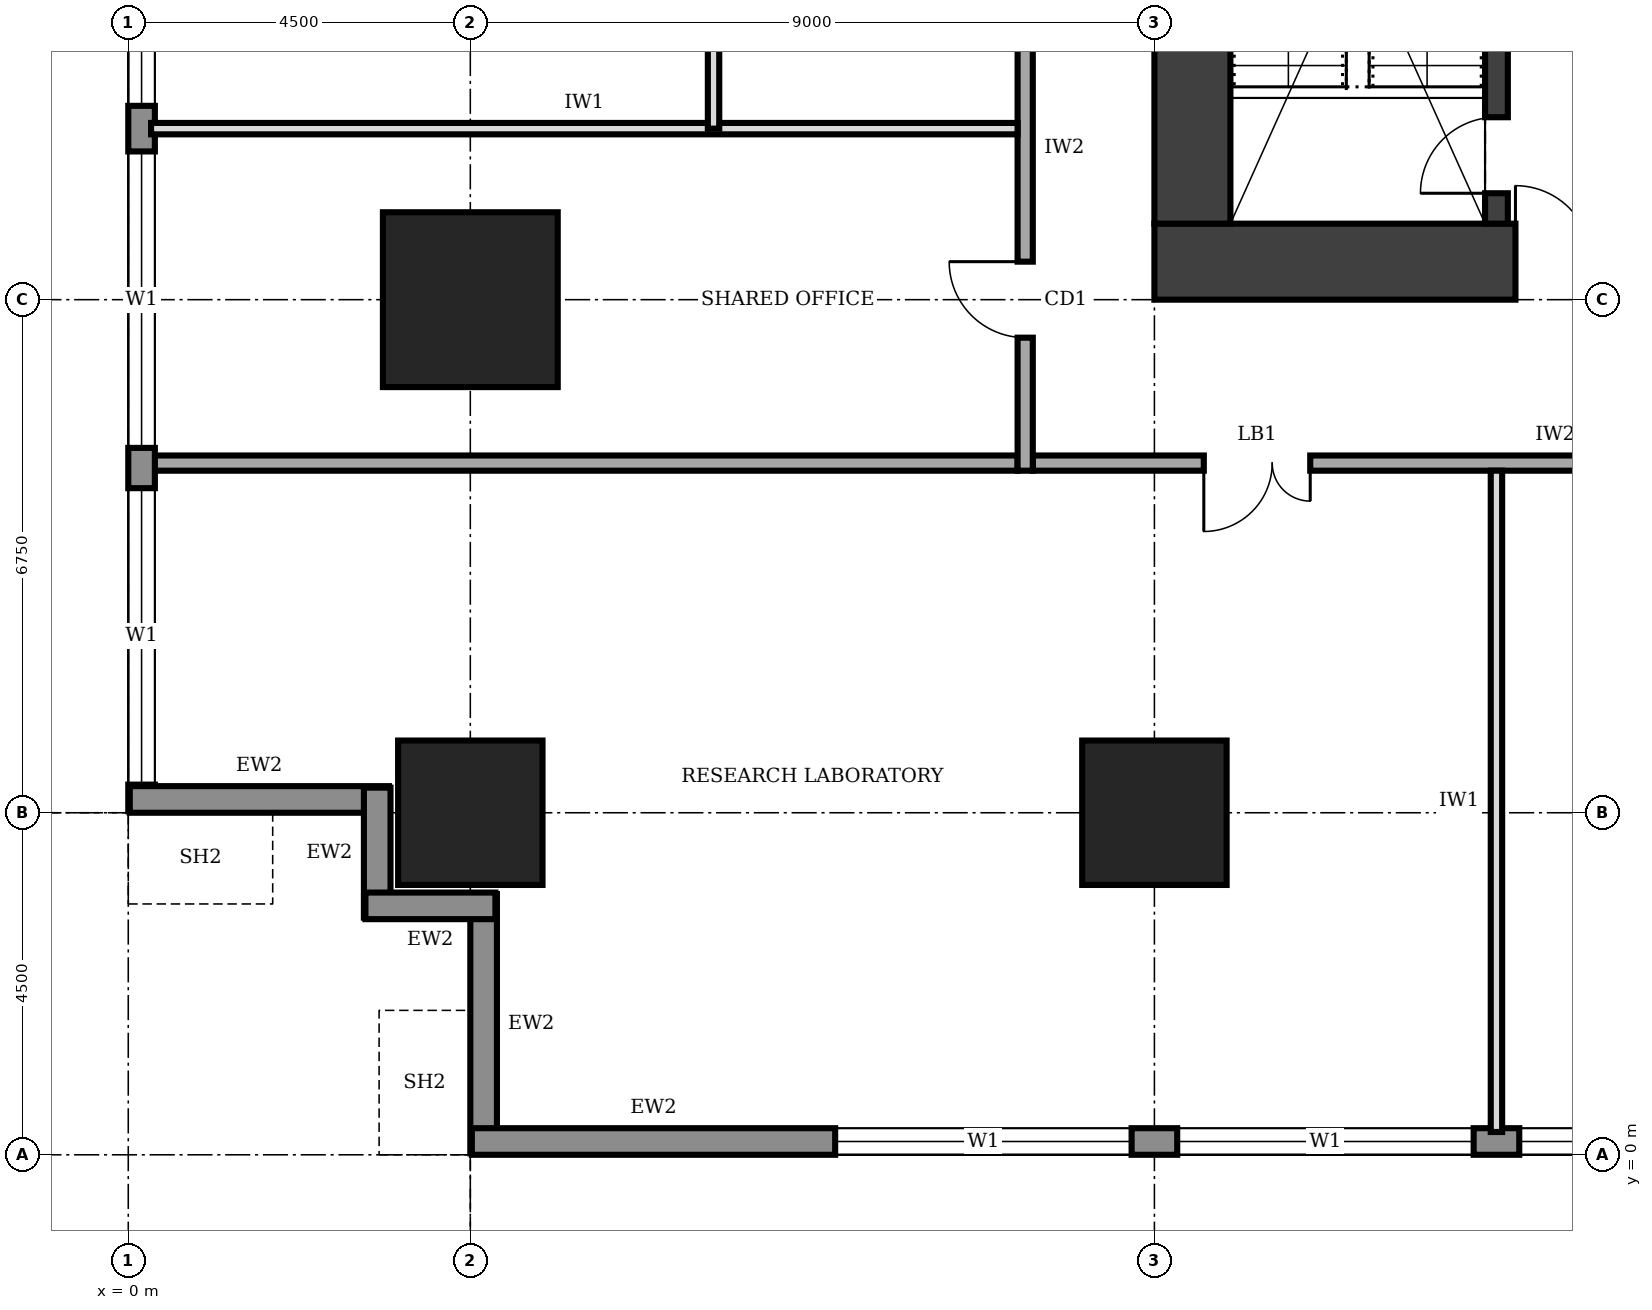
"""IFC4 building model, lengths in metres.
Left out: names, types, materials, properties, quantities, classifications, styles, units other than length and angle.
Written with IfcOpenShell. Run it as: python <this file> out.ifc"""

import sys

from ifc_helpers import new_model, si_unit, direction, frame, frame_2d, origin, origin_2d, place, context, subcontext, project, spatial, rectangle, extrude, element, fill, save


model = new_model("IFC4")
c1 = context("Model", 3, precision=1e-05, world=origin(), true_north=direction((0.0, 1.0)))
c2 = subcontext(c1, "Body", "Model", "MODEL_VIEW")
j1 = project(units=[si_unit("LENGTHUNIT", "METRE"), si_unit("PLANEANGLEUNIT", "RADIAN")], contexts=[c1])
p1 = place(None, origin())
s1 = spatial("IfcSite", under=j1, at=p1, CompositionType="ELEMENT")
p2 = place(p1, origin())
s2 = spatial("IfcBuilding", under=s1, at=p2, CompositionType="ELEMENT")
p3 = place(p2, frame((0.0, 0.0, 117.0)))
s3 = spatial("IfcBuildingStorey", under=s2, at=p3, CompositionType="ELEMENT", Elevation=117.0)
p4 = place(p3, frame((13.5, 11.75, 0.0), z_axis=(0.0, 0.0, 1.0), x_axis=(1.0, 0.0, 0.0)))
e1 = element("IfcWall", 1, at=p4, inside=s3, PredefinedType="SHEAR", context=c2, shape_type="SweptSolid", body=[
    extrude(rectangle(XDim=13.5, YDim=1.0, at=frame_2d((6.75, 0.0))), origin(), (0.0, 0.0, 1.0), 4.0),
])
p5 = place(p4, frame((4.75, 0.0, 0.0)))
e2 = element("IfcOpeningElement", 2, at=p5, cuts=e1, PredefinedType="OPENING", context=c2, shape_type="SweptSolid", body=[
    extrude(rectangle(XDim=1.0, YDim=2.1, at=frame_2d((0.5, 1.05))), frame((0.0, 0.51, 0.0), z_axis=(0.0, -1.0, 0.0), x_axis=(1.0, 0.0, 0.0)), (0.0, 0.0, 1.0), 1.02),
])
p6 = place(p3, frame((14.0, 28.25, 0.0), z_axis=(0.0, 0.0, 1.0), x_axis=(0.0, -1.0, 0.0)))
e3 = element("IfcWall", 3, at=p6, inside=s3, PredefinedType="SHEAR", context=c2, shape_type="SweptSolid", body=[
    extrude(rectangle(XDim=16.0, YDim=1.0, at=frame_2d((8.0, 0.0))), origin(), (0.0, 0.0, 1.0), 4.0),
])
p7 = place(p3, frame((18.0, 12.25, 0.0), z_axis=(0.0, 0.0, 1.0), x_axis=(0.0, 1.0, 0.0)))
e4 = element("IfcWall", 4, at=p7, inside=s3, PredefinedType="SHEAR", context=c2, shape_type="SweptSolid", body=[
    extrude(rectangle(XDim=16.0, YDim=0.3, at=frame_2d((8.0, 0.0))), origin(), (0.0, 0.0, 1.0), 4.0),
])
p8 = place(p7, frame((0.4, 0.0, 0.0)))
e5 = element("IfcOpeningElement", 5, at=p8, cuts=e4, PredefinedType="OPENING", context=c2, shape_type="SweptSolid", body=[
    extrude(rectangle(XDim=1.0, YDim=2.1, at=frame_2d((0.5, 1.05))), frame((0.0, 0.16, 0.0), z_axis=(0.0, -1.0, 0.0), x_axis=(1.0, 0.0, 0.0)), (0.0, 0.0, 1.0), 0.32),
])
p9 = place(p7, frame((14.525, 0.0, 0.0)))
e6 = element("IfcOpeningElement", 6, at=p9, cuts=e4, PredefinedType="OPENING", context=c2, shape_type="SweptSolid", body=[
    extrude(rectangle(XDim=1.1, YDim=2.1, at=frame_2d((0.55, 1.05))), frame((0.0, 0.16, 0.0), z_axis=(0.0, -1.0, 0.0), x_axis=(1.0, 0.0, 0.0)), (0.0, 0.0, 1.0), 0.32),
])
p10 = place(p7, frame((9.0, 0.0, 0.0)))
e7 = element("IfcOpeningElement", 7, at=p10, cuts=e4, PredefinedType="OPENING", context=c2, shape_type="SweptSolid", body=[
    extrude(rectangle(XDim=1.0, YDim=2.1, at=frame_2d((0.5, 1.05))), frame((0.0, 0.16, 0.0), z_axis=(0.0, -1.0, 0.0), x_axis=(1.0, 0.0, 0.0)), (0.0, 0.0, 1.0), 0.32),
])
p11 = place(p7, frame((12.0, 0.0, 0.0)))
e8 = element("IfcOpeningElement", 8, at=p11, cuts=e4, PredefinedType="OPENING", context=c2, shape_type="SweptSolid", body=[
    extrude(rectangle(XDim=1.0, YDim=2.1, at=frame_2d((0.5, 1.05))), frame((0.0, 0.16, 0.0), z_axis=(0.0, -1.0, 0.0), x_axis=(1.0, 0.0, 0.0)), (0.0, 0.0, 1.0), 0.32),
])
for number, where, z_axis, x_axis in (
    (9, (4.5, 4.5, 0.0), (0.0, 0.0, 1.0), (1.0, 0.0, 0.0)),
    (10, (13.5, 4.5, 0.0), (0.0, 0.0, 1.0), (1.0, 0.0, 0.0)),
):
    element("IfcColumn", number, at=place(p3, frame(where, z_axis=z_axis, x_axis=x_axis)), inside=s3, PredefinedType="COLUMN", context=c2, shape_type="SweptSolid", body=[
        extrude(rectangle(XDim=1.9, YDim=1.9, at=origin_2d()), origin(), (0.0, 0.0, 1.0), 4.0),
    ])
p12 = place(p3, frame((4.5, 11.25, 0.0), z_axis=(0.0, 0.0, 1.0), x_axis=(1.0, 0.0, 0.0)))
e11 = element("IfcColumn", 11, at=p12, inside=s3, PredefinedType="COLUMN", context=c2, shape_type="SweptSolid", body=[
    extrude(rectangle(XDim=2.3, YDim=2.3, at=origin_2d()), origin(), (0.0, 0.0, 1.0), 4.0),
])
p13 = place(p3, frame((4.675, 3.43, 0.0), z_axis=(0.0, 0.0, 1.0), x_axis=(0.0, -1.0, 0.0)))
e12 = element("IfcWall", 12, at=p13, inside=s3, PredefinedType="STANDARD", context=c2, shape_type="SweptSolid", body=[
    extrude(rectangle(XDim=3.41, YDim=0.35, at=frame_2d((1.705, 0.0))), origin(), (0.0, 0.0, 1.0), 2.85),
])
p14 = place(p3, frame((4.52, 0.175, 0.0), z_axis=(0.0, 0.0, 1.0), x_axis=(1.0, 0.0, 0.0)))
e13 = element("IfcWall", 13, at=p14, inside=s3, PredefinedType="STANDARD", context=c2, shape_type="SweptSolid", body=[
    extrude(rectangle(XDim=31.46, YDim=0.35, at=frame_2d((15.73, 0.0))), origin(), (0.0, 0.0, 1.0), 3.75),
])
p15 = place(p14, frame((4.78, 0.0, 0.9)))
e14 = element("IfcOpeningElement", 14, at=p15, cuts=e13, PredefinedType="OPENING", context=c2, shape_type="SweptSolid", body=[
    extrude(rectangle(XDim=3.9, YDim=2.2, at=frame_2d((1.95, 1.1))), frame((0.0, 0.185, 0.0), z_axis=(0.0, -1.0, 0.0), x_axis=(1.0, 0.0, 0.0)), (0.0, 0.0, 1.0), 0.37),
])
p16 = place(p14, frame((9.28, 0.0, 0.9)))
e15 = element("IfcOpeningElement", 15, at=p16, cuts=e13, PredefinedType="OPENING", context=c2, shape_type="SweptSolid", body=[
    extrude(rectangle(XDim=3.9, YDim=2.2, at=frame_2d((1.95, 1.1))), frame((0.0, 0.185, 0.0), z_axis=(0.0, -1.0, 0.0), x_axis=(1.0, 0.0, 0.0)), (0.0, 0.0, 1.0), 0.37),
])
p17 = place(p14, frame((13.78, 0.0, 0.9)))
e16 = element("IfcOpeningElement", 16, at=p17, cuts=e13, PredefinedType="OPENING", context=c2, shape_type="SweptSolid", body=[
    extrude(rectangle(XDim=3.9, YDim=2.2, at=frame_2d((1.95, 1.1))), frame((0.0, 0.185, 0.0), z_axis=(0.0, -1.0, 0.0), x_axis=(1.0, 0.0, 0.0)), (0.0, 0.0, 1.0), 0.37),
])
p18 = place(p14, frame((18.28, 0.0, 0.9)))
e17 = element("IfcOpeningElement", 17, at=p18, cuts=e13, PredefinedType="OPENING", context=c2, shape_type="SweptSolid", body=[
    extrude(rectangle(XDim=3.9, YDim=2.2, at=frame_2d((1.95, 1.1))), frame((0.0, 0.185, 0.0), z_axis=(0.0, -1.0, 0.0), x_axis=(1.0, 0.0, 0.0)), (0.0, 0.0, 1.0), 0.37),
])
p19 = place(p14, frame((22.78, 0.0, 0.9)))
e18 = element("IfcOpeningElement", 18, at=p19, cuts=e13, PredefinedType="OPENING", context=c2, shape_type="SweptSolid", body=[
    extrude(rectangle(XDim=3.9, YDim=2.2, at=frame_2d((1.95, 1.1))), frame((0.0, 0.185, 0.0), z_axis=(0.0, -1.0, 0.0), x_axis=(1.0, 0.0, 0.0)), (0.0, 0.0, 1.0), 0.37),
])
p20 = place(p14, frame((27.21, 0.0, 0.9)))
e19 = element("IfcOpeningElement", 19, at=p20, cuts=e13, PredefinedType="OPENING", context=c2, shape_type="SweptSolid", body=[
    extrude(rectangle(XDim=3.9, YDim=2.2, at=frame_2d((1.95, 1.1))), frame((0.0, 0.185, 0.0), z_axis=(0.0, -1.0, 0.0), x_axis=(1.0, 0.0, 0.0)), (0.0, 0.0, 1.0), 0.37),
])
p21 = place(p3, frame((0.175, 35.98, 0.0), z_axis=(0.0, 0.0, 1.0), x_axis=(0.0, -1.0, 0.0)))
e20 = element("IfcWall", 20, at=p21, inside=s3, PredefinedType="STANDARD", context=c2, shape_type="SweptSolid", body=[
    extrude(rectangle(XDim=31.46, YDim=0.35, at=frame_2d((15.73, 0.0))), origin(), (0.0, 0.0, 1.0), 3.75),
])
p22 = place(p21, frame((27.21, 0.0, 0.9)))
e21 = element("IfcOpeningElement", 21, at=p22, cuts=e20, PredefinedType="OPENING", context=c2, shape_type="SweptSolid", body=[
    extrude(rectangle(XDim=3.9, YDim=2.2, at=frame_2d((1.95, 1.1))), frame((0.0, 0.185, 0.0), z_axis=(0.0, -1.0, 0.0), x_axis=(1.0, 0.0, 0.0)), (0.0, 0.0, 1.0), 0.37),
])
p23 = place(p21, frame((22.78, 0.0, 0.9)))
e22 = element("IfcOpeningElement", 22, at=p23, cuts=e20, PredefinedType="OPENING", context=c2, shape_type="SweptSolid", body=[
    extrude(rectangle(XDim=3.9, YDim=2.2, at=frame_2d((1.95, 1.1))), frame((0.0, 0.185, 0.0), z_axis=(0.0, -1.0, 0.0), x_axis=(1.0, 0.0, 0.0)), (0.0, 0.0, 1.0), 0.37),
])
p24 = place(p21, frame((18.28, 0.0, 0.9)))
e23 = element("IfcOpeningElement", 23, at=p24, cuts=e20, PredefinedType="OPENING", context=c2, shape_type="SweptSolid", body=[
    extrude(rectangle(XDim=3.9, YDim=2.2, at=frame_2d((1.95, 1.1))), frame((0.0, 0.185, 0.0), z_axis=(0.0, -1.0, 0.0), x_axis=(1.0, 0.0, 0.0)), (0.0, 0.0, 1.0), 0.37),
])
p25 = place(p21, frame((13.78, 0.0, 0.9)))
e24 = element("IfcOpeningElement", 24, at=p25, cuts=e20, PredefinedType="OPENING", context=c2, shape_type="SweptSolid", body=[
    extrude(rectangle(XDim=3.9, YDim=2.2, at=frame_2d((1.95, 1.1))), frame((0.0, 0.185, 0.0), z_axis=(0.0, -1.0, 0.0), x_axis=(1.0, 0.0, 0.0)), (0.0, 0.0, 1.0), 0.37),
])
p26 = place(p21, frame((9.28, 0.0, 0.9)))
e25 = element("IfcOpeningElement", 25, at=p26, cuts=e20, PredefinedType="OPENING", context=c2, shape_type="SweptSolid", body=[
    extrude(rectangle(XDim=3.9, YDim=2.2, at=frame_2d((1.95, 1.1))), frame((0.0, 0.185, 0.0), z_axis=(0.0, -1.0, 0.0), x_axis=(1.0, 0.0, 0.0)), (0.0, 0.0, 1.0), 0.37),
])
p27 = place(p21, frame((4.78, 0.0, 0.9)))
e26 = element("IfcOpeningElement", 26, at=p27, cuts=e20, PredefinedType="OPENING", context=c2, shape_type="SweptSolid", body=[
    extrude(rectangle(XDim=3.9, YDim=2.2, at=frame_2d((1.95, 1.1))), frame((0.0, 0.185, 0.0), z_axis=(0.0, -1.0, 0.0), x_axis=(1.0, 0.0, 0.0)), (0.0, 0.0, 1.0), 0.37),
])
p28 = place(p3, frame((0.02, 4.675, 0.0), z_axis=(0.0, 0.0, 1.0), x_axis=(1.0, 0.0, 0.0)))
e27 = element("IfcWall", 27, at=p28, inside=s3, PredefinedType="STANDARD", context=c2, shape_type="SweptSolid", body=[
    extrude(rectangle(XDim=3.41, YDim=0.35, at=frame_2d((1.705, 0.0))), origin(), (0.0, 0.0, 1.0), 2.85),
])
for number, where, z_axis, x_axis in (
    (28, (3.275, 4.83, 0.0), (0.0, 0.0, 1.0), (0.0, -1.0, 0.0)),
    (29, (3.12, 3.275, 0.0), (0.0, 0.0, 1.0), (1.0, 0.0, 0.0)),
):
    element("IfcWall", number, at=place(p3, frame(where, z_axis=z_axis, x_axis=x_axis)), inside=s3, PredefinedType="STANDARD", context=c2, shape_type="SweptSolid", body=[
        extrude(rectangle(XDim=1.71, YDim=0.35, at=frame_2d((0.855, 0.0))), origin(), (0.0, 0.0, 1.0), 3.75),
    ])
p29 = place(p3, frame((11.9, 9.1, 0.0), z_axis=(0.0, 0.0, 1.0), x_axis=(1.0, 0.0, 0.0)))
e30 = element("IfcWall", 30, at=p29, inside=s3, PredefinedType="SOLIDWALL", context=c2, shape_type="SweptSolid", body=[
    extrude(rectangle(XDim=17.65, YDim=0.2, at=frame_2d((8.825, 0.0))), origin(), (0.0, 0.0, 1.0), 3.75),
])
p30 = place(p29, frame((2.25, 0.0, 0.0)))
e31 = element("IfcOpeningElement", 31, at=p30, cuts=e30, PredefinedType="OPENING", context=c2, shape_type="SweptSolid", body=[
    extrude(rectangle(XDim=1.4, YDim=2.1, at=frame_2d((0.7, 1.05))), frame((0.0, 0.11, 0.0), z_axis=(0.0, -1.0, 0.0), x_axis=(1.0, 0.0, 0.0)), (0.0, 0.0, 1.0), 0.22),
])
p31 = place(p29, frame((10.1, 0.0, 0.0)))
e32 = element("IfcOpeningElement", 32, at=p31, cuts=e30, PredefinedType="OPENING", context=c2, shape_type="SweptSolid", body=[
    extrude(rectangle(XDim=1.0, YDim=2.1, at=frame_2d((0.5, 1.05))), frame((0.0, 0.11, 0.0), z_axis=(0.0, -1.0, 0.0), x_axis=(1.0, 0.0, 0.0)), (0.0, 0.0, 1.0), 0.22),
])
p32 = place(p29, frame((15.875, 0.0, 0.0)))
e33 = element("IfcOpeningElement", 33, at=p32, cuts=e30, PredefinedType="OPENING", context=c2, shape_type="SweptSolid", body=[
    extrude(rectangle(XDim=1.0, YDim=2.1, at=frame_2d((0.5, 1.05))), frame((0.0, 0.11, 0.0), z_axis=(0.0, -1.0, 0.0), x_axis=(1.0, 0.0, 0.0)), (0.0, 0.0, 1.0), 0.22),
])
p33 = place(p3, frame((11.8, 32.05, 0.0), z_axis=(0.0, 0.0, 1.0), x_axis=(0.0, -1.0, 0.0)))
e34 = element("IfcWall", 34, at=p33, inside=s3, PredefinedType="SOLIDWALL", context=c2, shape_type="SweptSolid", body=[
    extrude(rectangle(XDim=23.05, YDim=0.2, at=frame_2d((11.525, 0.0))), origin(), (0.0, 0.0, 1.0), 3.75),
])
p34 = place(p33, frame((20.3, 0.0, 0.0)))
e35 = element("IfcOpeningElement", 35, at=p34, cuts=e34, PredefinedType="OPENING", context=c2, shape_type="SweptSolid", body=[
    extrude(rectangle(XDim=1.0, YDim=2.1, at=frame_2d((0.5, 1.05))), frame((0.0, 0.11, 0.0), z_axis=(0.0, -1.0, 0.0), x_axis=(1.0, 0.0, 0.0)), (0.0, 0.0, 1.0), 0.22),
])
p35 = place(p33, frame((16.4, 0.0, 0.0)))
e36 = element("IfcOpeningElement", 36, at=p35, cuts=e34, PredefinedType="OPENING", context=c2, shape_type="SweptSolid", body=[
    extrude(rectangle(XDim=0.9, YDim=2.1, at=frame_2d((0.45, 1.05))), frame((0.0, 0.11, 0.0), z_axis=(0.0, -1.0, 0.0), x_axis=(1.0, 0.0, 0.0)), (0.0, 0.0, 1.0), 0.22),
])
p36 = place(p33, frame((11.6, 0.0, 0.0)))
e37 = element("IfcOpeningElement", 37, at=p36, cuts=e34, PredefinedType="OPENING", context=c2, shape_type="SweptSolid", body=[
    extrude(rectangle(XDim=0.9, YDim=2.1, at=frame_2d((0.45, 1.05))), frame((0.0, 0.11, 0.0), z_axis=(0.0, -1.0, 0.0), x_axis=(1.0, 0.0, 0.0)), (0.0, 0.0, 1.0), 0.22),
])
p37 = place(p33, frame((8.55, 0.0, 0.0)))
e38 = element("IfcOpeningElement", 38, at=p37, cuts=e34, PredefinedType="OPENING", context=c2, shape_type="SweptSolid", body=[
    extrude(rectangle(XDim=0.9, YDim=2.1, at=frame_2d((0.45, 1.05))), frame((0.0, 0.11, 0.0), z_axis=(0.0, -1.0, 0.0), x_axis=(1.0, 0.0, 0.0)), (0.0, 0.0, 1.0), 0.22),
])
p38 = place(p33, frame((5.55, 0.0, 0.0)))
e39 = element("IfcOpeningElement", 39, at=p38, cuts=e34, PredefinedType="OPENING", context=c2, shape_type="SweptSolid", body=[
    extrude(rectangle(XDim=1.0, YDim=2.1, at=frame_2d((0.5, 1.05))), frame((0.0, 0.11, 0.0), z_axis=(0.0, -1.0, 0.0), x_axis=(1.0, 0.0, 0.0)), (0.0, 0.0, 1.0), 0.22),
])
p39 = place(p33, frame((13.65, 0.0, 0.0)))
e40 = element("IfcOpeningElement", 40, at=p39, cuts=e34, PredefinedType="OPENING", context=c2, shape_type="SweptSolid", body=[
    extrude(rectangle(XDim=1.0, YDim=2.1, at=frame_2d((0.5, 1.05))), frame((0.0, 0.11, 0.0), z_axis=(0.0, -1.0, 0.0), x_axis=(1.0, 0.0, 0.0)), (0.0, 0.0, 1.0), 0.22),
])
p40 = place(p33, frame((1.925, 0.0, 0.0)))
e41 = element("IfcOpeningElement", 41, at=p40, cuts=e34, PredefinedType="OPENING", context=c2, shape_type="SweptSolid", body=[
    extrude(rectangle(XDim=1.0, YDim=2.1, at=frame_2d((0.5, 1.05))), frame((0.0, 0.11, 0.0), z_axis=(0.0, -1.0, 0.0), x_axis=(1.0, 0.0, 0.0)), (0.0, 0.0, 1.0), 0.22),
])
p41 = place(p3, frame((0.3, 9.1, 0.0), z_axis=(0.0, 0.0, 1.0), x_axis=(1.0, 0.0, 0.0)))
e42 = element("IfcWall", 42, at=p41, inside=s3, PredefinedType="SOLIDWALL", context=c2, shape_type="SweptSolid", body=[
    extrude(rectangle(XDim=11.4, YDim=0.2, at=frame_2d((5.7, 0.0))), origin(), (0.0, 0.0, 1.0), 3.75),
])
p42 = place(p3, frame((18.0, 0.3, 0.0), z_axis=(0.0, 0.0, 1.0), x_axis=(0.0, 1.0, 0.0)))
e43 = element("IfcWall", 43, at=p42, inside=s3, PredefinedType="PARTITIONING", context=c2, shape_type="SweptSolid", body=[
    extrude(rectangle(XDim=8.7, YDim=0.15, at=frame_2d((4.35, 0.0))), origin(), (0.0, 0.0, 1.0), 3.75),
])
p43 = place(p3, frame((0.3, 13.5, 0.0), z_axis=(0.0, 0.0, 1.0), x_axis=(1.0, 0.0, 0.0)))
e44 = element("IfcWall", 44, at=p43, inside=s3, PredefinedType="PARTITIONING", context=c2, shape_type="SweptSolid", body=[
    extrude(rectangle(XDim=11.4, YDim=0.15, at=frame_2d((5.7, 0.0))), origin(), (0.0, 0.0, 1.0), 3.75),
])
p44 = place(p3, frame((7.7, 13.5, 0.0), z_axis=(0.0, 0.0, 1.0), x_axis=(0.0, 1.0, 0.0)))
e45 = element("IfcWall", 45, at=p44, inside=s3, PredefinedType="PARTITIONING", context=c2, shape_type="SweptSolid", body=[
    extrude(rectangle(XDim=3.4, YDim=0.15, at=frame_2d((1.7, 0.0))), origin(), (0.0, 0.0, 1.0), 3.75),
])
p45 = place(p15, origin())
e46 = element("IfcWindow", 46, at=p45, inside=s3, PartitioningType="SINGLE_PANEL", PredefinedType="WINDOW", context=c2, shape_type="SweptSolid", body=[
    extrude(rectangle(XDim=3.9, YDim=2.2, at=frame_2d((1.95, 1.1))), frame((0.0, 0.03, 0.0), z_axis=(0.0, -1.0, 0.0), x_axis=(1.0, 0.0, 0.0)), (0.0, 0.0, 1.0), 0.06),
])
fill(e14, e46)
p46 = place(p16, origin())
e47 = element("IfcWindow", 47, at=p46, inside=s3, PartitioningType="SINGLE_PANEL", PredefinedType="WINDOW", context=c2, shape_type="SweptSolid", body=[
    extrude(rectangle(XDim=3.9, YDim=2.2, at=frame_2d((1.95, 1.1))), frame((0.0, 0.03, 0.0), z_axis=(0.0, -1.0, 0.0), x_axis=(1.0, 0.0, 0.0)), (0.0, 0.0, 1.0), 0.06),
])
fill(e15, e47)
p47 = place(p17, origin())
e48 = element("IfcWindow", 48, at=p47, inside=s3, PartitioningType="SINGLE_PANEL", PredefinedType="WINDOW", context=c2, shape_type="SweptSolid", body=[
    extrude(rectangle(XDim=3.9, YDim=2.2, at=frame_2d((1.95, 1.1))), frame((0.0, 0.03, 0.0), z_axis=(0.0, -1.0, 0.0), x_axis=(1.0, 0.0, 0.0)), (0.0, 0.0, 1.0), 0.06),
])
fill(e16, e48)
p48 = place(p22, origin())
e49 = element("IfcWindow", 49, at=p48, inside=s3, PartitioningType="SINGLE_PANEL", PredefinedType="WINDOW", context=c2, shape_type="SweptSolid", body=[
    extrude(rectangle(XDim=3.9, YDim=2.2, at=frame_2d((1.95, 1.1))), frame((0.0, 0.03, 0.0), z_axis=(0.0, -1.0, 0.0), x_axis=(1.0, 0.0, 0.0)), (0.0, 0.0, 1.0), 0.06),
])
fill(e21, e49)
p49 = place(p23, origin())
e50 = element("IfcWindow", 50, at=p49, inside=s3, PartitioningType="SINGLE_PANEL", PredefinedType="WINDOW", context=c2, shape_type="SweptSolid", body=[
    extrude(rectangle(XDim=3.9, YDim=2.2, at=frame_2d((1.95, 1.1))), frame((0.0, 0.03, 0.0), z_axis=(0.0, -1.0, 0.0), x_axis=(1.0, 0.0, 0.0)), (0.0, 0.0, 1.0), 0.06),
])
fill(e22, e50)
p50 = place(p24, origin())
e51 = element("IfcWindow", 51, at=p50, inside=s3, PartitioningType="SINGLE_PANEL", PredefinedType="WINDOW", context=c2, shape_type="SweptSolid", body=[
    extrude(rectangle(XDim=3.9, YDim=2.2, at=frame_2d((1.95, 1.1))), frame((0.0, 0.03, 0.0), z_axis=(0.0, -1.0, 0.0), x_axis=(1.0, 0.0, 0.0)), (0.0, 0.0, 1.0), 0.06),
])
fill(e23, e51)
p51 = place(p5, origin())
e52 = element("IfcDoor", 52, at=p51, inside=s3, OperationType="SINGLE_SWING_LEFT", PredefinedType="DOOR", context=c2, shape_type="SweptSolid", body=[
    extrude(rectangle(XDim=1.0, YDim=2.1, at=frame_2d((0.5, 1.05))), frame((0.0, 0.025, 0.0), z_axis=(0.0, -1.0, 0.0), x_axis=(1.0, 0.0, 0.0)), (0.0, 0.0, 1.0), 0.05),
])
fill(e2, e52)
p52 = place(p8, origin())
e53 = element("IfcDoor", 53, at=p52, inside=s3, OperationType="SINGLE_SWING_LEFT", PredefinedType="DOOR", context=c2, shape_type="SweptSolid", body=[
    extrude(rectangle(XDim=1.0, YDim=2.1, at=frame_2d((0.5, 1.05))), frame((0.0, 0.025, 0.0), z_axis=(0.0, -1.0, 0.0), x_axis=(1.0, 0.0, 0.0)), (0.0, 0.0, 1.0), 0.05),
])
fill(e5, e53)
p53 = place(p30, frame((1.4, 0.0, 0.0), z_axis=(0.0, 0.0, 1.0), x_axis=(-1.0, 0.0, 0.0)))
e54 = element("IfcDoor", 54, at=p53, inside=s3, OperationType="DOUBLE_DOOR_SINGLE_SWING", PredefinedType="DOOR", context=c2, shape_type="SweptSolid", body=[
    extrude(rectangle(XDim=1.4, YDim=2.1, at=frame_2d((0.7, 1.05))), frame((0.0, 0.025, 0.0), z_axis=(0.0, -1.0, 0.0), x_axis=(1.0, 0.0, 0.0)), (0.0, 0.0, 1.0), 0.05),
])
fill(e31, e54)
p54 = place(p34, frame((1.0, 0.0, 0.0), z_axis=(0.0, 0.0, 1.0), x_axis=(-1.0, 0.0, 0.0)))
e55 = element("IfcDoor", 55, at=p54, inside=s3, OperationType="SINGLE_SWING_RIGHT", PredefinedType="DOOR", context=c2, shape_type="SweptSolid", body=[
    extrude(rectangle(XDim=1.0, YDim=2.1, at=frame_2d((0.5, 1.05))), frame((0.0, 0.025, 0.0), z_axis=(0.0, -1.0, 0.0), x_axis=(1.0, 0.0, 0.0)), (0.0, 0.0, 1.0), 0.05),
])
fill(e35, e55)
save(model, sys.argv[1])
